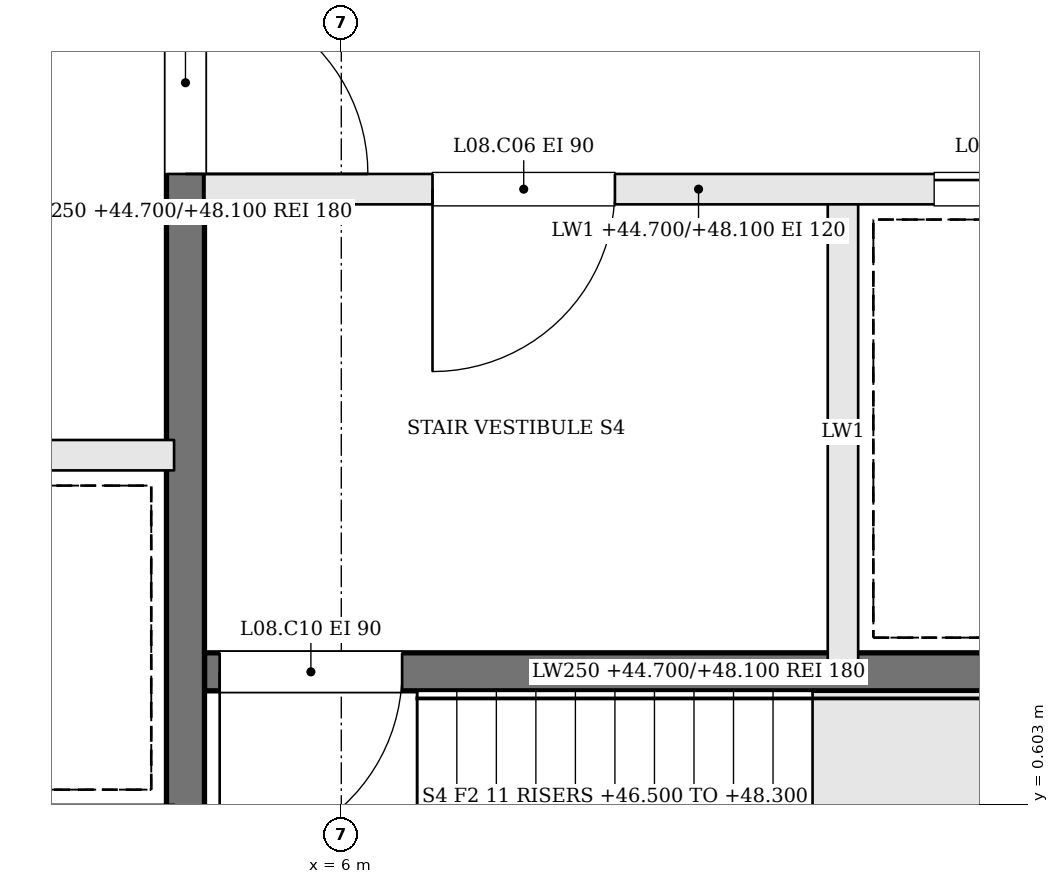
"""IFC4 building model, lengths in metres.
Left out: names, types, materials, properties, quantities, classifications, styles, units other than length and angle.
Written with IfcOpenShell. Run it as: python <this file> out.ifc"""

import sys

from ifc_helpers import new_model, si_unit, direction, frame, frame_2d, origin, place, context, subcontext, project, spatial, rectangle, extrude, element, fill, save


model = new_model("IFC4")
c1 = context("Model", 3, precision=1e-05, world=origin(), true_north=direction((0.0, 1.0)))
c2 = subcontext(c1, "Body", "Model", "MODEL_VIEW")
j1 = project(units=[si_unit("LENGTHUNIT", "METRE"), si_unit("PLANEANGLEUNIT", "RADIAN")], contexts=[c1])
p1 = place(None, origin())
s1 = spatial("IfcSite", under=j1, at=p1, CompositionType="ELEMENT")
p2 = place(p1, origin())
s2 = spatial("IfcBuilding", under=s1, at=p2, CompositionType="ELEMENT")
p3 = place(p2, frame((0.0, 0.0, 44.7)))
s3 = spatial("IfcBuildingStorey", under=s2, at=p3, CompositionType="ELEMENT", Elevation=44.7)
p4 = place(p3, frame((11.6, 4.65, 0.0), z_axis=(0.0, 0.0, 1.0), x_axis=(-1.0, 0.0, 0.0)))
e1 = element("IfcWall", 1, at=p4, inside=s3, PredefinedType="SOLIDWALL", context=c2, shape_type="SweptSolid", body=[
    extrude(rectangle(XDim=6.5, YDim=0.2, at=frame_2d((3.25, 0.0))), origin(), (0.0, 0.0, 1.0), 3.4),
])
p5 = place(p4, frame((3.8, 0.0, 0.0)))
e2 = element("IfcOpeningElement", 2, at=p5, cuts=e1, PredefinedType="OPENING", context=c2, shape_type="SweptSolid", body=[
    extrude(rectangle(XDim=1.2, YDim=2.1, at=frame_2d((0.6, 1.05))), frame((0.0, 0.11, 0.0), z_axis=(0.0, -1.0, 0.0), x_axis=(1.0, 0.0, 0.0)), (0.0, 0.0, 1.0), 0.22),
])
p6 = place(p4, frame((0.5, 0.0, 0.0)))
e3 = element("IfcOpeningElement", 3, at=p6, cuts=e1, PredefinedType="OPENING", context=c2, shape_type="SweptSolid", body=[
    extrude(rectangle(XDim=1.2, YDim=2.1, at=frame_2d((0.6, 1.05))), frame((0.0, 0.11, 0.0), z_axis=(0.0, -1.0, 0.0), x_axis=(1.0, 0.0, 0.0)), (0.0, 0.0, 1.0), 0.22),
])
p7 = place(p3, frame((11.6, 1.475, 0.0), z_axis=(0.0, 0.0, 1.0), x_axis=(-1.0, 0.0, 0.0)))
e4 = element("IfcWall", 4, at=p7, inside=s3, PredefinedType="SOLIDWALL", context=c2, shape_type="SweptSolid", body=[
    extrude(rectangle(XDim=6.5, YDim=0.25, at=frame_2d((3.25, 0.0))), origin(), (0.0, 0.0, 1.0), 3.4),
])
p8 = place(p7, frame((5.2, 0.0, 0.0)))
e5 = element("IfcOpeningElement", 5, at=p8, cuts=e4, PredefinedType="OPENING", context=c2, shape_type="SweptSolid", body=[
    extrude(rectangle(XDim=1.2, YDim=2.1, at=frame_2d((0.6, 1.05))), frame((0.0, 0.135, 0.0), z_axis=(0.0, -1.0, 0.0), x_axis=(1.0, 0.0, 0.0)), (0.0, 0.0, 1.0), 0.27),
])
p9 = place(p3, frame((9.3, 4.55, 0.0), z_axis=(0.0, 0.0, 1.0), x_axis=(0.0, -1.0, 0.0)))
e6 = element("IfcWall", 6, at=p9, inside=s3, PredefinedType="SOLIDWALL", context=c2, shape_type="SweptSolid", body=[
    extrude(rectangle(XDim=3.0, YDim=0.2, at=frame_2d((1.5, 0.0))), origin(), (0.0, 0.0, 1.0), 3.4),
])
p10 = place(p3, frame((4.975, 10.6, 0.0), z_axis=(0.0, 0.0, 1.0), x_axis=(0.0, -1.0, 0.0)))
e7 = element("IfcWall", 7, at=p10, inside=s3, PredefinedType="SOLIDWALL", context=c2, shape_type="SweptSolid", body=[
    extrude(rectangle(XDim=12.2, YDim=0.25, at=frame_2d((6.1, 0.0))), origin(), (0.0, 0.0, 1.0), 3.4),
])
p11 = place(p10, frame((4.65, 0.0, 0.0)))
e8 = element("IfcOpeningElement", 8, at=p11, cuts=e7, PredefinedType="OPENING", context=c2, shape_type="SweptSolid", body=[
    extrude(rectangle(XDim=1.2, YDim=2.1, at=frame_2d((0.6, 1.05))), frame((0.0, 0.135, 0.0), z_axis=(0.0, -1.0, 0.0), x_axis=(1.0, 0.0, 0.0)), (0.0, 0.0, 1.0), 0.27),
])
p12 = place(p3, frame((-4.9, 2.9, 0.0), z_axis=(0.0, 0.0, 1.0), x_axis=(1.0, 0.0, 0.0)))
e9 = element("IfcWall", 9, at=p12, inside=s3, PredefinedType="SOLIDWALL", context=c2, shape_type="SweptSolid", body=[
    extrude(rectangle(XDim=9.8, YDim=0.2, at=frame_2d((4.9, 0.0))), origin(), (0.0, 0.0, 1.0), 3.4),
])
p13 = place(p12, frame((0.675, 0.0, 0.0)))
e10 = element("IfcOpeningElement", 10, at=p13, cuts=e9, PredefinedType="OPENING", context=c2, shape_type="SweptSolid", body=[
    extrude(rectangle(XDim=1.1, YDim=2.1, at=frame_2d((0.55, 1.05))), frame((0.0, 0.11, 0.0), z_axis=(0.0, -1.0, 0.0), x_axis=(1.0, 0.0, 0.0)), (0.0, 0.0, 1.0), 0.22),
])
p14 = place(p12, frame((3.125, 0.0, 0.0)))
e11 = element("IfcOpeningElement", 11, at=p14, cuts=e9, PredefinedType="OPENING", context=c2, shape_type="SweptSolid", body=[
    extrude(rectangle(XDim=1.1, YDim=2.1, at=frame_2d((0.55, 1.05))), frame((0.0, 0.11, 0.0), z_axis=(0.0, -1.0, 0.0), x_axis=(1.0, 0.0, 0.0)), (0.0, 0.0, 1.0), 0.22),
])
p15 = place(p11, origin())
e12 = element("IfcDoor", 12, at=p15, inside=s3, OperationType="SINGLE_SWING_RIGHT", PredefinedType="DOOR", context=c2, shape_type="SweptSolid", body=[
    extrude(rectangle(XDim=1.2, YDim=2.1, at=frame_2d((0.6, 1.05))), frame((0.0, 0.025, 0.0), z_axis=(0.0, -1.0, 0.0), x_axis=(1.0, 0.0, 0.0)), (0.0, 0.0, 1.0), 0.05),
])
fill(e8, e12)
p16 = place(p5, origin())
e13 = element("IfcDoor", 13, at=p16, inside=s3, OperationType="SINGLE_SWING_RIGHT", PredefinedType="DOOR", context=c2, shape_type="SweptSolid", body=[
    extrude(rectangle(XDim=1.2, YDim=2.1, at=frame_2d((0.6, 1.05))), frame((0.0, 0.025, 0.0), z_axis=(0.0, -1.0, 0.0), x_axis=(1.0, 0.0, 0.0)), (0.0, 0.0, 1.0), 0.05),
])
fill(e2, e13)
p17 = place(p8, origin())
e14 = element("IfcDoor", 14, at=p17, inside=s3, OperationType="SINGLE_SWING_RIGHT", PredefinedType="DOOR", context=c2, shape_type="SweptSolid", body=[
    extrude(rectangle(XDim=1.2, YDim=2.1, at=frame_2d((0.6, 1.05))), frame((0.0, 0.025, 0.0), z_axis=(0.0, -1.0, 0.0), x_axis=(1.0, 0.0, 0.0)), (0.0, 0.0, 1.0), 0.05),
])
fill(e5, e14)
p18 = place(p6, origin())
e15 = element("IfcDoor", 15, at=p18, inside=s3, OperationType="SLIDING_TO_RIGHT", PredefinedType="DOOR", context=c2, shape_type="SweptSolid", body=[
    extrude(rectangle(XDim=1.2, YDim=2.1, at=frame_2d((0.6, 1.05))), frame((0.0, 0.025, 0.0), z_axis=(0.0, -1.0, 0.0), x_axis=(1.0, 0.0, 0.0)), (0.0, 0.0, 1.0), 0.05),
])
fill(e3, e15)
save(model, sys.argv[1])
